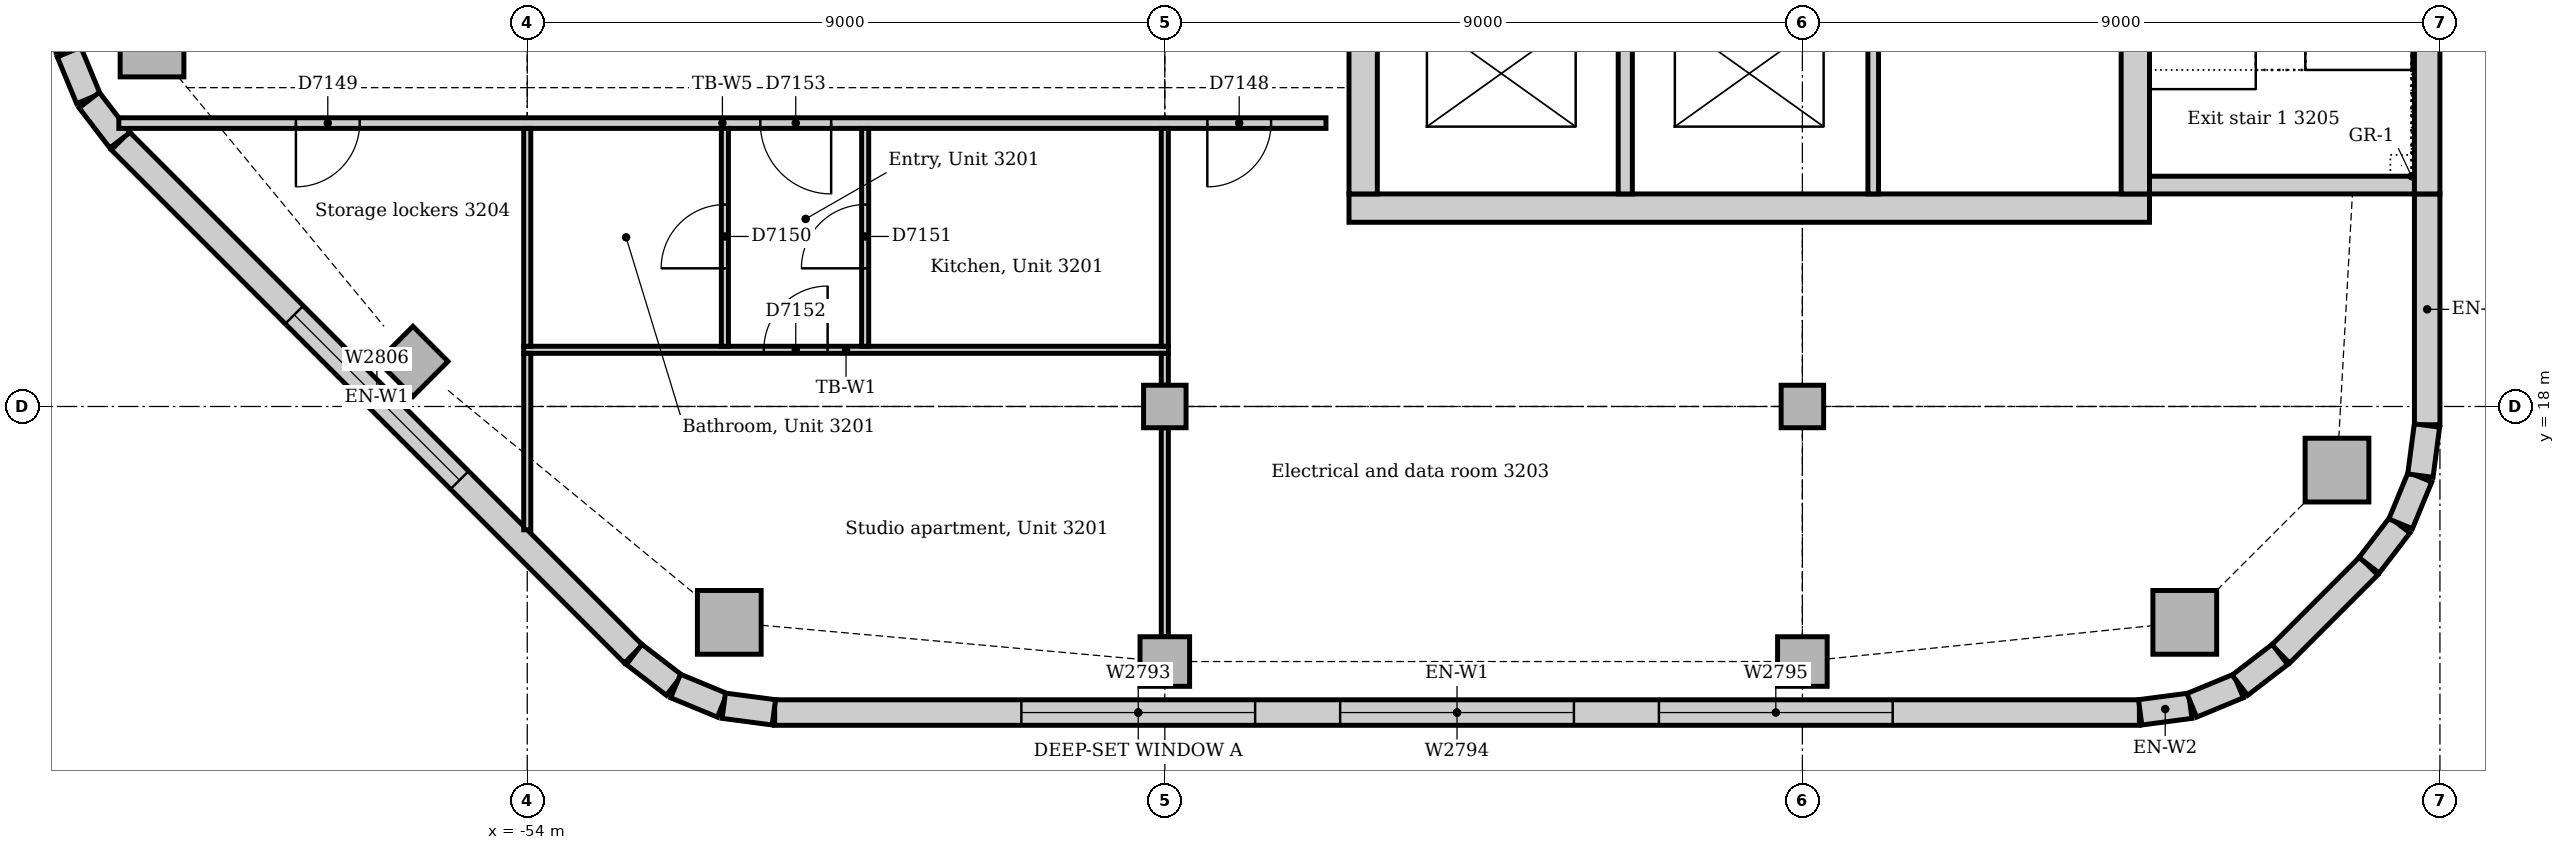
"""IFC4 building model, lengths in metres.
Left out: names, types, materials, properties, quantities, classifications, styles, units other than length and angle.
Written with IfcOpenShell. Run it as: python <this file> out.ifc"""

import sys

from ifc_helpers import new_model, si_unit, direction, frame, frame_2d, origin, origin_2d, place, context, subcontext, project, spatial, rectangle, extrude, element, fill, save


model = new_model("IFC4")
c1 = context("Model", 3, precision=1e-05, world=origin(), true_north=direction((0.0, 1.0)))
c2 = subcontext(c1, "Body", "Model", "MODEL_VIEW")
j1 = project(units=[si_unit("LENGTHUNIT", "METRE"), si_unit("PLANEANGLEUNIT", "RADIAN")], contexts=[c1])
p1 = place(None, origin())
s1 = spatial("IfcSite", under=j1, at=p1, CompositionType="ELEMENT")
p2 = place(p1, origin())
s2 = spatial("IfcBuilding", under=s1, at=p2, CompositionType="ELEMENT")
p3 = place(p2, frame((0.0, 0.0, 136.0)))
s3 = spatial("IfcBuildingStorey", under=s2, at=p3, CompositionType="ELEMENT", Elevation=136.0)
p4 = place(p3, frame((-42.4, 20.8, 0.0), z_axis=(0.0, 0.0, 1.0), x_axis=(1.0, 0.0, 0.0)))
e1 = element("IfcWall", 1, at=p4, inside=s3, PredefinedType="SOLIDWALL", context=c2, shape_type="SweptSolid", body=[
    extrude(rectangle(XDim=11.3, YDim=0.4, at=frame_2d((5.65, 0.0))), origin(), (0.0, 0.0, 1.0), 4.0),
])
p5 = place(p3, frame((-31.3, 21.0, 0.0), z_axis=(0.0, 0.0, 1.0), x_axis=(0.0, 1.0, 0.0)))
e2 = element("IfcWall", 2, at=p5, inside=s3, PredefinedType="SOLIDWALL", context=c2, shape_type="SweptSolid", body=[
    extrude(rectangle(XDim=9.5, YDim=0.4, at=frame_2d((4.75, 0.0))), origin(), (0.0, 0.0, 1.0), 4.0),
])
p6 = place(p5, frame((5.25, 0.0, 0.0)))
e3 = element("IfcOpeningElement", 3, at=p6, cuts=e2, PredefinedType="OPENING", context=c2, shape_type="SweptSolid", body=[
    extrude(rectangle(XDim=1.0, YDim=2.1, at=frame_2d((0.5, 1.05))), frame((0.0, 0.21, 0.0), z_axis=(0.0, -1.0, 0.0), x_axis=(1.0, 0.0, 0.0)), (0.0, 0.0, 1.0), 0.42),
])
p7 = place(p3, frame((-42.2, 30.5, 0.0), z_axis=(0.0, 0.0, 1.0), x_axis=(0.0, -1.0, 0.0)))
e4 = element("IfcWall", 4, at=p7, inside=s3, PredefinedType="SOLIDWALL", context=c2, shape_type="SweptSolid", body=[
    extrude(rectangle(XDim=9.5, YDim=0.4, at=frame_2d((4.75, 0.0))), origin(), (0.0, 0.0, 1.0), 4.0),
])
p8 = place(p7, frame((3.85, 0.0, 0.0)))
e5 = element("IfcOpeningElement", 5, at=p8, cuts=e4, PredefinedType="OPENING", context=c2, shape_type="SweptSolid", body=[
    extrude(rectangle(XDim=1.8, YDim=2.1, at=frame_2d((0.9, 1.05))), frame((0.0, 0.21, 0.0), z_axis=(0.0, -1.0, 0.0), x_axis=(1.0, 0.0, 0.0)), (0.0, 0.0, 1.0), 0.42),
])
p9 = place(p3, frame((-31.1, 21.125, 0.0), z_axis=(0.0, 0.0, 1.0), x_axis=(1.0, 0.0, 0.0)))
e6 = element("IfcWall", 6, at=p9, inside=s3, PredefinedType="SOLIDWALL", context=c2, shape_type="SweptSolid", body=[
    extrude(rectangle(XDim=3.74, YDim=0.25, at=frame_2d((1.87, 0.0))), origin(), (0.0, 0.0, 1.0), 4.0),
])
for number, where, z_axis, x_axis in (
    (7, (-51.148, 14.953, 0.0), (0.0, 0.0, 1.0), (1.0, 0.0, 0.0)),
    (8, (-30.602, 14.953, 0.0), (0.0, 0.0, 1.0), (1.0, 0.0, 0.0)),
    (9, (-28.453, 17.102, 0.0), (0.0, 0.0, 1.0), (1.0, 0.0, 0.0)),
    (10, (-59.297, 23.102, 0.0), (0.0, 0.0, 1.0), (1.0, 0.0, 0.0)),
):
    element("IfcColumn", number, at=place(p3, frame(where, z_axis=z_axis, x_axis=x_axis)), inside=s3, PredefinedType="COLUMN", context=c2, shape_type="SweptSolid", body=[
        extrude(rectangle(XDim=0.9, YDim=0.9, at=origin_2d()), origin(), (0.0, 0.0, 1.0), 3.85),
    ])
for number, where, z_axis, x_axis in (
    (11, (-45.0, 14.4, 0.0), (0.0, 0.0, 1.0), (1.0, 0.0, 0.0)),
    (12, (-36.0, 14.4, 0.0), (0.0, 0.0, 1.0), (1.0, 0.0, 0.0)),
    (13, (-55.614, 18.636, 0.0), (0.0, 0.0, 1.0), (0.707, 0.707, 0.0)),
):
    element("IfcColumn", number, at=place(p3, frame(where, z_axis=z_axis, x_axis=x_axis)), inside=s3, PredefinedType="COLUMN", context=c2, shape_type="SweptSolid", body=[
        extrude(rectangle(XDim=0.7, YDim=0.7, at=origin_2d()), origin(), (0.0, 0.0, 1.0), 3.85),
    ])
for number, where, z_axis, x_axis in (
    (14, (-45.0, 18.0, 0.0), (0.0, 0.0, 1.0), (1.0, 0.0, 0.0)),
    (15, (-36.0, 18.0, 0.0), (0.0, 0.0, 1.0), (1.0, 0.0, 0.0)),
):
    element("IfcColumn", number, at=place(p3, frame(where, z_axis=z_axis, x_axis=x_axis)), inside=s3, PredefinedType="COLUMN", context=c2, shape_type="SweptSolid", body=[
        extrude(rectangle(XDim=0.6, YDim=0.6, at=origin_2d()), origin(), (0.0, 0.0, 1.0), 3.85),
    ])
p10 = place(p3, frame((-50.507, 13.68, 0.0), z_axis=(0.0, 0.0, 1.0), x_axis=(1.0, 0.0, 0.0)))
e16 = element("IfcWall", 16, at=p10, inside=s3, PredefinedType="STANDARD", context=c2, shape_type="SweptSolid", body=[
    extrude(rectangle(XDim=19.265, YDim=0.36, at=frame_2d((9.632, 0.0))), origin(), (0.0, 0.0, 1.0), 3.85),
])
p11 = place(p10, frame((3.482, 0.0, 0.9)))
e17 = element("IfcOpeningElement", 17, at=p11, cuts=e16, PredefinedType="OPENING", context=c2, shape_type="SweptSolid", body=[
    extrude(rectangle(XDim=3.3, YDim=1.6, at=frame_2d((1.65, 0.8))), frame((0.0, 0.19, 0.0), z_axis=(0.0, -1.0, 0.0), x_axis=(1.0, 0.0, 0.0)), (0.0, 0.0, 1.0), 0.38),
])
p12 = place(p10, frame((7.982, 0.0, 0.9)))
e18 = element("IfcOpeningElement", 18, at=p12, cuts=e16, PredefinedType="OPENING", context=c2, shape_type="SweptSolid", body=[
    extrude(rectangle(XDim=3.3, YDim=1.6, at=frame_2d((1.65, 0.8))), frame((0.0, 0.19, 0.0), z_axis=(0.0, -1.0, 0.0), x_axis=(1.0, 0.0, 0.0)), (0.0, 0.0, 1.0), 0.38),
])
p13 = place(p10, frame((12.482, 0.0, 0.9)))
e19 = element("IfcOpeningElement", 19, at=p13, cuts=e16, PredefinedType="OPENING", context=c2, shape_type="SweptSolid", body=[
    extrude(rectangle(XDim=3.3, YDim=1.6, at=frame_2d((1.65, 0.8))), frame((0.0, 0.19, 0.0), z_axis=(0.0, -1.0, 0.0), x_axis=(1.0, 0.0, 0.0)), (0.0, 0.0, 1.0), 0.38),
])
p14 = place(p3, frame((-29.249, 14.506, 0.0), z_axis=(0.0, 0.0, 1.0), x_axis=(0.707106781187, 0.707106781187, 0.0)))
e20 = element("IfcWall", 20, at=p14, inside=s3, PredefinedType="STANDARD", context=c2, shape_type="SweptSolid", body=[
    extrude(rectangle(XDim=1.757, YDim=0.36, at=frame_2d((0.879, 0.0))), origin(), (0.0, 0.0, 1.0), 3.85),
])
p15 = place(p3, frame((-27.18, 17.743, 0.0), z_axis=(0.0, 0.0, 1.0), x_axis=(0.0, 1.0, 0.0)))
e21 = element("IfcWall", 21, at=p15, inside=s3, PredefinedType="STANDARD", context=c2, shape_type="SweptSolid", body=[
    extrude(rectangle(XDim=3.257, YDim=0.36, at=frame_2d((1.629, 0.0))), origin(), (0.0, 0.0, 1.0), 3.85),
])
p16 = place(p3, frame((-27.18, 21.0, 0.0), z_axis=(0.0, 0.0, 1.0), x_axis=(0.0, 1.0, 0.0)))
e22 = element("IfcWall", 22, at=p16, inside=s3, PredefinedType="STANDARD", context=c2, shape_type="SweptSolid", body=[
    extrude(rectangle(XDim=6.0, YDim=0.36, at=frame_2d((3.0, 0.0))), origin(), (0.0, 0.0, 1.0), 3.85),
])
p17 = place(p3, frame((-59.744, 21.749, 0.0), z_axis=(0.0, 0.0, 1.0), x_axis=(0.707106781187, -0.707106781187, 0.0)))
e23 = element("IfcWall", 23, at=p17, inside=s3, PredefinedType="STANDARD", context=c2, shape_type="SweptSolid", body=[
    extrude(rectangle(XDim=10.243, YDim=0.36, at=frame_2d((5.121, 0.0))), origin(), (0.0, 0.0, 1.0), 3.85),
])
p18 = place(p17, frame((3.471, 0.0, 0.9)))
e24 = element("IfcOpeningElement", 24, at=p18, cuts=e23, PredefinedType="OPENING", context=c2, shape_type="SweptSolid", body=[
    extrude(rectangle(XDim=3.3, YDim=1.6, at=frame_2d((1.65, 0.8))), frame((0.0, 0.19, 0.0), z_axis=(0.0, -1.0, 0.0), x_axis=(1.0, 0.0, 0.0)), (0.0, 0.0, 1.0), 0.38),
])
for number, where, z_axis, x_axis in (
    (25, (-31.231, 13.683, 0.0), (0.0, 0.0, 1.0), (0.991, 0.131, 0.0)),
    (26, (-30.503, 13.782, 0.0), (0.0, 0.0, 1.0), (0.924, 0.383, 0.0)),
):
    element("IfcWall", number, at=place(p3, frame(where, z_axis=z_axis, x_axis=x_axis)), inside=s3, PredefinedType="STANDARD", context=c2, shape_type="SweptSolid", body=[
        extrude(rectangle(XDim=0.713, YDim=0.36, at=frame_2d((0.356, 0.0))), origin(), (0.0, 0.0, 1.0), 3.85),
    ])
for number, where, z_axis, x_axis in (
    (27, (-29.825, 14.066, 0.0), (0.0, 0.0, 1.0), (0.793, 0.609, 0.0)),
    (28, (-28.0, 15.759, 0.0), (0.0, 0.0, 1.0), (0.609, 0.793, 0.0)),
):
    element("IfcWall", number, at=place(p3, frame(where, z_axis=z_axis, x_axis=x_axis)), inside=s3, PredefinedType="STANDARD", context=c2, shape_type="SweptSolid", body=[
        extrude(rectangle(XDim=0.713, YDim=0.36, at=frame_2d((0.357, 0.0))), origin(), (0.0, 0.0, 1.0), 3.85),
    ])
for number, where, z_axis, x_axis in (
    (29, (-27.555, 16.344, 0.0), (0.0, 0.0, 1.0), (0.383, 0.924, 0.0)),
    (30, (-27.276, 17.024, 0.0), (0.0, 0.0, 1.0), (0.131, 0.991, 0.0)),
    (31, (-60.468, 23.003, 0.0), (0.0, 0.0, 1.0), (0.383, -0.924, 0.0)),
):
    element("IfcWall", number, at=place(p3, frame(where, z_axis=z_axis, x_axis=x_axis)), inside=s3, PredefinedType="STANDARD", context=c2, shape_type="SweptSolid", body=[
        extrude(rectangle(XDim=0.713, YDim=0.36, at=frame_2d((0.356, 0.0))), origin(), (0.0, 0.0, 1.0), 3.85),
    ])
for number, where, z_axis, x_axis in (
    (32, (-60.184, 22.325, 0.0), (0.0, 0.0, 1.0), (0.609, -0.793, 0.0)),
    (33, (-52.491, 14.5, 0.0), (0.0, 0.0, 1.0), (0.793, -0.609, 0.0)),
):
    element("IfcWall", number, at=place(p3, frame(where, z_axis=z_axis, x_axis=x_axis)), inside=s3, PredefinedType="STANDARD", context=c2, shape_type="SweptSolid", body=[
        extrude(rectangle(XDim=0.713, YDim=0.36, at=frame_2d((0.357, 0.0))), origin(), (0.0, 0.0, 1.0), 3.85),
    ])
for number, where, z_axis, x_axis in (
    (34, (-51.906, 14.055, 0.0), (0.0, 0.0, 1.0), (0.924, -0.383, 0.0)),
    (35, (-51.226, 13.776, 0.0), (0.0, 0.0, 1.0), (0.991, -0.131, 0.0)),
):
    element("IfcWall", number, at=place(p3, frame(where, z_axis=z_axis, x_axis=x_axis)), inside=s3, PredefinedType="STANDARD", context=c2, shape_type="SweptSolid", body=[
        extrude(rectangle(XDim=0.713, YDim=0.36, at=frame_2d((0.356, 0.0))), origin(), (0.0, 0.0, 1.0), 3.85),
    ])
p19 = place(p3, frame((-38.5, 21.0, 0.0), z_axis=(0.0, 0.0, 1.0), x_axis=(0.0, 1.0, 0.0)))
e36 = element("IfcWall", 36, at=p19, inside=s3, PredefinedType="SOLIDWALL", context=c2, shape_type="SweptSolid", body=[
    extrude(rectangle(XDim=3.1, YDim=0.2, at=frame_2d((1.55, 0.0))), origin(), (0.0, 0.0, 1.0), 4.0),
])
p20 = place(p3, frame((-35.0, 21.0, 0.0), z_axis=(0.0, 0.0, 1.0), x_axis=(0.0, 1.0, 0.0)))
e37 = element("IfcWall", 37, at=p20, inside=s3, PredefinedType="SOLIDWALL", context=c2, shape_type="SweptSolid", body=[
    extrude(rectangle(XDim=2.9, YDim=0.15, at=frame_2d((1.45, 0.0))), origin(), (0.0, 0.0, 1.0), 4.0),
])
p21 = place(p3, frame((-59.766, 22.0, 0.0), z_axis=(0.0, 0.0, 1.0), x_axis=(1.0, 0.0, 0.0)))
e38 = element("IfcWall", 38, at=p21, inside=s3, PredefinedType="PARTITIONING", context=c2, shape_type="SweptSolid", body=[
    extrude(rectangle(XDim=17.041, YDim=0.15, at=frame_2d((8.52, 0.0))), origin(), (0.0, 0.0, 1.0), 3.85),
])
p22 = place(p21, frame((15.366, 0.0, 0.0)))
e39 = element("IfcOpeningElement", 39, at=p22, cuts=e38, PredefinedType="OPENING", context=c2, shape_type="SweptSolid", body=[
    extrude(rectangle(XDim=0.9, YDim=2.1, at=frame_2d((0.45, 1.05))), frame((0.0, 0.085, 0.0), z_axis=(0.0, -1.0, 0.0), x_axis=(1.0, 0.0, 0.0)), (0.0, 0.0, 1.0), 0.17),
])
p23 = place(p21, frame((2.5, 0.0, 0.0)))
e40 = element("IfcOpeningElement", 40, at=p23, cuts=e38, PredefinedType="OPENING", context=c2, shape_type="SweptSolid", body=[
    extrude(rectangle(XDim=0.9, YDim=2.1, at=frame_2d((0.45, 1.05))), frame((0.0, 0.085, 0.0), z_axis=(0.0, -1.0, 0.0), x_axis=(1.0, 0.0, 0.0)), (0.0, 0.0, 1.0), 0.17),
])
p24 = place(p21, frame((9.056, 0.0, 0.0)))
e41 = element("IfcOpeningElement", 41, at=p24, cuts=e38, PredefinedType="OPENING", context=c2, shape_type="SweptSolid", body=[
    extrude(rectangle(XDim=1.0, YDim=2.1, at=frame_2d((0.5, 1.05))), frame((0.0, 0.085, 0.0), z_axis=(0.0, -1.0, 0.0), x_axis=(1.0, 0.0, 0.0)), (0.0, 0.0, 1.0), 0.17),
])
p25 = place(p3, frame((-54.05, 18.8, 0.0), z_axis=(0.0, 0.0, 1.0), x_axis=(1.0, 0.0, 0.0)))
e42 = element("IfcWall", 42, at=p25, inside=s3, PredefinedType="PARTITIONING", context=c2, shape_type="SweptSolid", body=[
    extrude(rectangle(XDim=9.1, YDim=0.1, at=frame_2d((4.55, 0.0))), origin(), (0.0, 0.0, 1.0), 3.85),
])
p26 = place(p25, frame((3.39, 0.0, 0.0)))
e43 = element("IfcOpeningElement", 43, at=p26, cuts=e42, PredefinedType="OPENING", context=c2, shape_type="SweptSolid", body=[
    extrude(rectangle(XDim=0.9, YDim=2.1, at=frame_2d((0.45, 1.05))), frame((0.0, 0.06, 0.0), z_axis=(0.0, -1.0, 0.0), x_axis=(1.0, 0.0, 0.0)), (0.0, 0.0, 1.0), 0.12),
])
p27 = place(p3, frame((-45.0, 18.85, 0.0), z_axis=(0.0, 0.0, 1.0), x_axis=(0.0, 1.0, 0.0)))
e44 = element("IfcWall", 44, at=p27, inside=s3, PredefinedType="PARTITIONING", context=c2, shape_type="SweptSolid", body=[
    extrude(rectangle(XDim=3.075, YDim=0.1, at=frame_2d((1.538, 0.0))), origin(), (0.0, 0.0, 1.0), 3.362),
])
p28 = place(p3, frame((-45.0, 18.3, 0.0), z_axis=(0.0, 0.0, 1.0), x_axis=(0.0, 1.0, 0.0)))
e45 = element("IfcWall", 45, at=p28, inside=s3, PredefinedType="PARTITIONING", context=c2, shape_type="SweptSolid", body=[
    extrude(rectangle(XDim=0.45, YDim=0.1, at=frame_2d((0.225, 0.0))), origin(), (0.0, 0.0, 1.0), 3.85),
])
p29 = place(p3, frame((-45.0, 14.75, 0.0), z_axis=(0.0, 0.0, 1.0), x_axis=(0.0, 1.0, 0.0)))
e46 = element("IfcWall", 46, at=p29, inside=s3, PredefinedType="PARTITIONING", context=c2, shape_type="SweptSolid", body=[
    extrude(rectangle(XDim=2.95, YDim=0.1, at=frame_2d((1.475, 0.0))), origin(), (0.0, 0.0, 1.0), 3.652),
])
p30 = place(p3, frame((-54.0, 18.85, 0.0), z_axis=(0.0, 0.0, 1.0), x_axis=(0.0, 1.0, 0.0)))
e47 = element("IfcWall", 47, at=p30, inside=s3, PredefinedType="PARTITIONING", context=c2, shape_type="SweptSolid", body=[
    extrude(rectangle(XDim=3.075, YDim=0.1, at=frame_2d((1.538, 0.0))), origin(), (0.0, 0.0, 1.0), 3.362),
])
p31 = place(p3, frame((-54.0, 16.259, 0.0), z_axis=(0.0, 0.0, 1.0), x_axis=(0.0, 1.0, 0.0)))
e48 = element("IfcWall", 48, at=p31, inside=s3, PredefinedType="PARTITIONING", context=c2, shape_type="SweptSolid", body=[
    extrude(rectangle(XDim=2.491, YDim=0.1, at=frame_2d((1.245, 0.0))), origin(), (0.0, 0.0, 1.0), 3.362),
])
p32 = place(p3, frame((-51.21, 18.85, 0.0), z_axis=(0.0, 0.0, 1.0), x_axis=(0.0, 1.0, 0.0)))
e49 = element("IfcWall", 49, at=p32, inside=s3, PredefinedType="PARTITIONING", context=c2, shape_type="SweptSolid", body=[
    extrude(rectangle(XDim=3.075, YDim=0.1, at=frame_2d((1.538, 0.0))), origin(), (0.0, 0.0, 1.0), 3.85),
])
p33 = place(p32, frame((1.1, 0.0, 0.0)))
e50 = element("IfcOpeningElement", 50, at=p33, cuts=e49, PredefinedType="OPENING", context=c2, shape_type="SweptSolid", body=[
    extrude(rectangle(XDim=0.9, YDim=2.1, at=frame_2d((0.45, 1.05))), frame((0.0, 0.06, 0.0), z_axis=(0.0, -1.0, 0.0), x_axis=(1.0, 0.0, 0.0)), (0.0, 0.0, 1.0), 0.12),
])
p34 = place(p3, frame((-49.23, 18.85, 0.0), z_axis=(0.0, 0.0, 1.0), x_axis=(0.0, 1.0, 0.0)))
e51 = element("IfcWall", 51, at=p34, inside=s3, PredefinedType="PARTITIONING", context=c2, shape_type="SweptSolid", body=[
    extrude(rectangle(XDim=3.075, YDim=0.1, at=frame_2d((1.538, 0.0))), origin(), (0.0, 0.0, 1.0), 3.85),
])
p35 = place(p34, frame((1.1, 0.0, 0.0)))
e52 = element("IfcOpeningElement", 52, at=p35, cuts=e51, PredefinedType="OPENING", context=c2, shape_type="SweptSolid", body=[
    extrude(rectangle(XDim=0.9, YDim=2.1, at=frame_2d((0.45, 1.05))), frame((0.0, 0.06, 0.0), z_axis=(0.0, -1.0, 0.0), x_axis=(1.0, 0.0, 0.0)), (0.0, 0.0, 1.0), 0.12),
])
p36 = place(p11, origin())
e53 = element("IfcWindow", 53, at=p36, inside=s3, PartitioningType="SINGLE_PANEL", PredefinedType="WINDOW", context=c2, shape_type="SweptSolid", body=[
    extrude(rectangle(XDim=3.3, YDim=1.6, at=frame_2d((1.65, 0.8))), frame((0.0, 0.13, 0.0), z_axis=(0.0, -1.0, 0.0), x_axis=(1.0, 0.0, 0.0)), (0.0, 0.0, 1.0), 0.06),
])
fill(e17, e53)
p37 = place(p12, origin())
e54 = element("IfcWindow", 54, at=p37, inside=s3, PartitioningType="SINGLE_PANEL", PredefinedType="WINDOW", context=c2, shape_type="SweptSolid", body=[
    extrude(rectangle(XDim=3.3, YDim=1.6, at=frame_2d((1.65, 0.8))), frame((0.0, 0.13, 0.0), z_axis=(0.0, -1.0, 0.0), x_axis=(1.0, 0.0, 0.0)), (0.0, 0.0, 1.0), 0.06),
])
fill(e18, e54)
p38 = place(p13, origin())
e55 = element("IfcWindow", 55, at=p38, inside=s3, PartitioningType="SINGLE_PANEL", PredefinedType="WINDOW", context=c2, shape_type="SweptSolid", body=[
    extrude(rectangle(XDim=3.3, YDim=1.6, at=frame_2d((1.65, 0.8))), frame((0.0, 0.13, 0.0), z_axis=(0.0, -1.0, 0.0), x_axis=(1.0, 0.0, 0.0)), (0.0, 0.0, 1.0), 0.06),
])
fill(e19, e55)
p39 = place(p18, origin())
e56 = element("IfcWindow", 56, at=p39, inside=s3, PartitioningType="SINGLE_PANEL", PredefinedType="WINDOW", context=c2, shape_type="SweptSolid", body=[
    extrude(rectangle(XDim=3.3, YDim=1.6, at=frame_2d((1.65, 0.8))), frame((0.0, 0.13, 0.0), z_axis=(0.0, -1.0, 0.0), x_axis=(1.0, 0.0, 0.0)), (0.0, 0.0, 1.0), 0.06),
])
fill(e24, e56)
p40 = place(p22, frame((0.9, 0.0, 0.0), z_axis=(0.0, 0.0, 1.0), x_axis=(-1.0, 0.0, 0.0)))
e57 = element("IfcDoor", 57, at=p40, inside=s3, OperationType="SINGLE_SWING_RIGHT", PredefinedType="DOOR", context=c2, shape_type="SweptSolid", body=[
    extrude(rectangle(XDim=0.9, YDim=2.1, at=frame_2d((0.45, 1.05))), frame((0.0, 0.025, 0.0), z_axis=(0.0, -1.0, 0.0), x_axis=(1.0, 0.0, 0.0)), (0.0, 0.0, 1.0), 0.05),
])
fill(e39, e57)
p41 = place(p23, frame((0.9, 0.0, 0.0), z_axis=(0.0, 0.0, 1.0), x_axis=(-1.0, 0.0, 0.0)))
e58 = element("IfcDoor", 58, at=p41, inside=s3, OperationType="SINGLE_SWING_RIGHT", PredefinedType="DOOR", context=c2, shape_type="SweptSolid", body=[
    extrude(rectangle(XDim=0.9, YDim=2.1, at=frame_2d((0.45, 1.05))), frame((0.0, 0.025, 0.0), z_axis=(0.0, -1.0, 0.0), x_axis=(1.0, 0.0, 0.0)), (0.0, 0.0, 1.0), 0.05),
])
fill(e40, e58)
p42 = place(p33, origin())
e59 = element("IfcDoor", 59, at=p42, inside=s3, OperationType="SINGLE_SWING_LEFT", PredefinedType="DOOR", context=c2, shape_type="SweptSolid", body=[
    extrude(rectangle(XDim=0.9, YDim=2.1, at=frame_2d((0.45, 1.05))), frame((0.0, 0.025, 0.0), z_axis=(0.0, -1.0, 0.0), x_axis=(1.0, 0.0, 0.0)), (0.0, 0.0, 1.0), 0.05),
])
fill(e50, e59)
p43 = place(p35, origin())
e60 = element("IfcDoor", 60, at=p43, inside=s3, OperationType="SINGLE_SWING_LEFT", PredefinedType="DOOR", context=c2, shape_type="SweptSolid", body=[
    extrude(rectangle(XDim=0.9, YDim=2.1, at=frame_2d((0.45, 1.05))), frame((0.0, 0.025, 0.0), z_axis=(0.0, -1.0, 0.0), x_axis=(1.0, 0.0, 0.0)), (0.0, 0.0, 1.0), 0.05),
])
fill(e52, e60)
p44 = place(p26, origin())
e61 = element("IfcDoor", 61, at=p44, inside=s3, OperationType="SINGLE_SWING_RIGHT", PredefinedType="DOOR", context=c2, shape_type="SweptSolid", body=[
    extrude(rectangle(XDim=0.9, YDim=2.1, at=frame_2d((0.45, 1.05))), frame((0.0, 0.025, 0.0), z_axis=(0.0, -1.0, 0.0), x_axis=(1.0, 0.0, 0.0)), (0.0, 0.0, 1.0), 0.05),
])
fill(e43, e61)
p45 = place(p24, frame((1.0, 0.0, 0.0), z_axis=(0.0, 0.0, 1.0), x_axis=(-1.0, 0.0, 0.0)))
e62 = element("IfcDoor", 62, at=p45, inside=s3, OperationType="SINGLE_SWING_LEFT", PredefinedType="DOOR", context=c2, shape_type="SweptSolid", body=[
    extrude(rectangle(XDim=1.0, YDim=2.1, at=frame_2d((0.5, 1.05))), frame((0.0, 0.025, 0.0), z_axis=(0.0, -1.0, 0.0), x_axis=(1.0, 0.0, 0.0)), (0.0, 0.0, 1.0), 0.05),
])
fill(e41, e62)
save(model, sys.argv[1])
